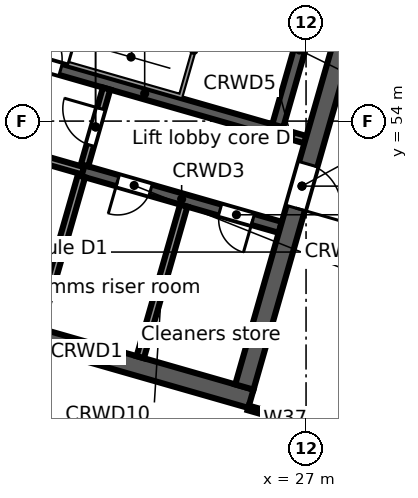
"""IFC4 building model, lengths in metres.
Left out: names, types, materials, properties, quantities, classifications, styles, units other than length and angle.
Written with IfcOpenShell. Run it as: python <this file> out.ifc"""

import sys

from ifc_helpers import new_model, si_unit, direction, frame, frame_2d, origin, place, context, subcontext, project, spatial, rectangle, extrude, element, fill, save


model = new_model("IFC4")
c1 = context("Model", 3, precision=1e-05, world=origin(), true_north=direction((0.0, 1.0)))
c2 = subcontext(c1, "Body", "Model", "MODEL_VIEW")
j1 = project(units=[si_unit("LENGTHUNIT", "METRE"), si_unit("PLANEANGLEUNIT", "RADIAN")], contexts=[c1])
p1 = place(None, origin())
s1 = spatial("IfcSite", under=j1, at=p1, CompositionType="ELEMENT")
p2 = place(p1, origin())
s2 = spatial("IfcBuilding", under=s1, at=p2, CompositionType="ELEMENT")
p3 = place(p2, frame((0.0, 0.0, 158.9)))
s3 = spatial("IfcBuildingStorey", under=s2, at=p3, CompositionType="ELEMENT", Elevation=158.9)
p4 = place(p3, frame((24.042, 41.106, 0.0), z_axis=(0.0, 0.0, 1.0), x_axis=(-0.961261693976, 0.275637362661, 0.0)))
e1 = element("IfcWall", 1, at=p4, inside=s3, PredefinedType="STANDARD", context=c2, shape_type="SweptSolid", body=[
    extrude(rectangle(XDim=24.948, YDim=0.3, at=frame_2d((12.474, 0.0))), origin(), (0.0, 0.0, 1.0), 3.68),
])
p5 = place(p4, frame((21.441, 0.0, 0.6)))
e2 = element("IfcOpeningElement", 2, at=p5, cuts=e1, PredefinedType="OPENING", context=c2, shape_type="SweptSolid", body=[
    extrude(rectangle(XDim=0.9, YDim=2.4, at=frame_2d((0.45, 1.2))), frame((0.0, 0.16, 0.0), z_axis=(0.0, -1.0, 0.0), x_axis=(1.0, 0.0, 0.0)), (0.0, 0.0, 1.0), 0.32),
])
p6 = place(p4, frame((13.121, 0.0, 0.6)))
e3 = element("IfcOpeningElement", 3, at=p6, cuts=e1, PredefinedType="OPENING", context=c2, shape_type="SweptSolid", body=[
    extrude(rectangle(XDim=0.9, YDim=2.4, at=frame_2d((0.45, 1.2))), frame((0.0, 0.16, 0.0), z_axis=(0.0, -1.0, 0.0), x_axis=(1.0, 0.0, 0.0)), (0.0, 0.0, 1.0), 0.32),
])
p7 = place(p4, frame((10.591, 0.0, 0.0)))
e4 = element("IfcOpeningElement", 4, at=p7, cuts=e1, PredefinedType="OPENING", context=c2, shape_type="SweptSolid", body=[
    extrude(rectangle(XDim=1.8, YDim=2.4, at=frame_2d((0.9, 1.2))), frame((0.0, 0.16, 0.0), z_axis=(0.0, -1.0, 0.0), x_axis=(1.0, 0.0, 0.0)), (0.0, 0.0, 1.0), 0.32),
])
p8 = place(p4, frame((4.8, 0.0, 0.6)))
e5 = element("IfcOpeningElement", 5, at=p8, cuts=e1, PredefinedType="OPENING", context=c2, shape_type="SweptSolid", body=[
    extrude(rectangle(XDim=0.9, YDim=2.4, at=frame_2d((0.45, 1.2))), frame((0.0, 0.16, 0.0), z_axis=(0.0, -1.0, 0.0), x_axis=(1.0, 0.0, 0.0)), (0.0, 0.0, 1.0), 0.32),
])
p9 = place(p4, frame((2.27, 0.0, 0.0)))
e6 = element("IfcOpeningElement", 6, at=p9, cuts=e1, PredefinedType="OPENING", context=c2, shape_type="SweptSolid", body=[
    extrude(rectangle(XDim=1.8, YDim=2.4, at=frame_2d((0.9, 1.2))), frame((0.0, 0.16, 0.0), z_axis=(0.0, -1.0, 0.0), x_axis=(1.0, 0.0, 0.0)), (0.0, 0.0, 1.0), 0.32),
])
p10 = place(p3, frame((37.399, 59.851, 0.0), z_axis=(0.0, 0.0, 1.0), x_axis=(-0.529919986982, -0.848047644532, 0.0)))
e7 = element("IfcWall", 7, at=p10, inside=s3, PredefinedType="STANDARD", context=c2, shape_type="SweptSolid", body=[
    extrude(rectangle(XDim=21.125, YDim=0.3, at=frame_2d((10.562, 0.0))), origin(), (0.0, 0.0, 1.0), 3.68),
])
p11 = place(p10, frame((16.687, 0.0, 0.6)))
e8 = element("IfcOpeningElement", 8, at=p11, cuts=e7, PredefinedType="OPENING", context=c2, shape_type="SweptSolid", body=[
    extrude(rectangle(XDim=0.9, YDim=2.4, at=frame_2d((0.45, 1.2))), frame((0.0, 0.16, 0.0), z_axis=(0.0, -1.0, 0.0), x_axis=(1.0, 0.0, 0.0)), (0.0, 0.0, 1.0), 0.32),
])
p12 = place(p10, frame((6.187, 0.0, 0.6)))
e9 = element("IfcOpeningElement", 9, at=p12, cuts=e7, PredefinedType="OPENING", context=c2, shape_type="SweptSolid", body=[
    extrude(rectangle(XDim=0.9, YDim=2.4, at=frame_2d((0.45, 1.2))), frame((0.0, 0.16, 0.0), z_axis=(0.0, -1.0, 0.0), x_axis=(1.0, 0.0, 0.0)), (0.0, 0.0, 1.0), 0.32),
])
p13 = place(p3, frame((16.897, 49.173, 0.0), z_axis=(0.0, 0.0, 1.0), x_axis=(0.96126248289, -0.275634611374, 0.0)))
e10 = element("IfcWall", 10, at=p13, inside=s3, PredefinedType="SOLIDWALL", context=c2, shape_type="SweptSolid", body=[
    extrude(rectangle(XDim=9.0, YDim=0.5, at=frame_2d((4.5, 0.0))), origin(), (0.0, 0.0, 1.0), 3.68),
])
p14 = place(p3, frame((18.632, 53.409, 0.0), z_axis=(0.0, 0.0, 1.0), x_axis=(0.961247078216, -0.275688328772, 0.0)))
e11 = element("IfcWall", 11, at=p14, inside=s3, PredefinedType="SOLIDWALL", context=c2, shape_type="SweptSolid", body=[
    extrude(rectangle(XDim=2.6, YDim=0.2, at=frame_2d((1.3, 0.0))), origin(), (0.0, 0.0, 1.0), 3.68),
])
p15 = place(p3, frame((21.131, 52.692, 0.0), z_axis=(0.0, 0.0, 1.0), x_axis=(0.961271043721, -0.27560475414, 0.0)))
e12 = element("IfcWall", 12, at=p15, inside=s3, PredefinedType="SOLIDWALL", context=c2, shape_type="SweptSolid", body=[
    extrude(rectangle(XDim=5.4, YDim=0.3, at=frame_2d((2.7, 0.0))), origin(), (0.0, 0.0, 1.0), 3.68),
])
p16 = place(p15, frame((0.95, 0.0, 0.0)))
e13 = element("IfcOpeningElement", 13, at=p16, cuts=e12, PredefinedType="OPENING", context=c2, shape_type="SweptSolid", body=[
    extrude(rectangle(XDim=0.9, YDim=2.1, at=frame_2d((0.45, 1.05))), frame((0.0, 0.16, 0.0), z_axis=(0.0, -1.0, 0.0), x_axis=(1.0, 0.0, 0.0)), (0.0, 0.0, 1.0), 0.32),
])
p17 = place(p15, frame((3.75, 0.0, 0.0)))
e14 = element("IfcOpeningElement", 14, at=p17, cuts=e12, PredefinedType="OPENING", context=c2, shape_type="SweptSolid", body=[
    extrude(rectangle(XDim=0.9, YDim=2.1, at=frame_2d((0.45, 1.05))), frame((0.0, 0.16, 0.0), z_axis=(0.0, -1.0, 0.0), x_axis=(1.0, 0.0, 0.0)), (0.0, 0.0, 1.0), 0.32),
])
p18 = place(p3, frame((19.293, 55.716, 0.0), z_axis=(0.0, 0.0, 1.0), x_axis=(0.96125862491, -0.275648065539, 0.0)))
e15 = element("IfcWall", 15, at=p18, inside=s3, PredefinedType="SOLIDWALL", context=c2, shape_type="SweptSolid", body=[
    extrude(rectangle(XDim=7.2, YDim=0.3, at=frame_2d((3.6, 0.0))), origin(), (0.0, 0.0, 1.0), 3.68),
])
p19 = place(p18, frame((0.3, 0.0, 0.0)))
e16 = element("IfcOpeningElement", 16, at=p19, cuts=e15, PredefinedType="OPENING", context=c2, shape_type="SweptSolid", body=[
    extrude(rectangle(XDim=1.0, YDim=2.1, at=frame_2d((0.5, 1.05))), frame((0.0, 0.16, 0.0), z_axis=(0.0, -1.0, 0.0), x_axis=(1.0, 0.0, 0.0)), (0.0, 0.0, 1.0), 0.32),
])
p20 = place(p3, frame((26.214, 53.732, 0.0), z_axis=(0.0, 0.0, 1.0), x_axis=(0.961200870072, -0.275849392554, 0.0)))
e17 = element("IfcWall", 17, at=p20, inside=s3, PredefinedType="SOLIDWALL", context=c2, shape_type="SweptSolid", body=[
    extrude(rectangle(XDim=0.8, YDim=0.2, at=frame_2d((0.4, 0.0))), origin(), (0.0, 0.0, 1.0), 3.68),
])
p21 = place(p3, frame((17.206, 49.344, 0.0), z_axis=(0.0, 0.0, 1.0), x_axis=(0.275632651182, 0.961263044958, 0.0)))
e18 = element("IfcWall", 18, at=p21, inside=s3, PredefinedType="SOLIDWALL", context=c2, shape_type="SweptSolid", body=[
    extrude(rectangle(XDim=11.0, YDim=0.5, at=frame_2d((5.5, 0.0))), origin(), (0.0, 0.0, 1.0), 3.68),
])
p22 = place(p21, frame((4.9, 0.0, 0.0)))
e19 = element("IfcOpeningElement", 19, at=p22, cuts=e18, PredefinedType="OPENING", context=c2, shape_type="SweptSolid", body=[
    extrude(rectangle(XDim=1.2, YDim=2.1, at=frame_2d((0.6, 1.05))), frame((0.0, 0.26, 0.0), z_axis=(0.0, -1.0, 0.0), x_axis=(1.0, 0.0, 0.0)), (0.0, 0.0, 1.0), 0.52),
])
p23 = place(p3, frame((19.946, 48.559, 0.0), z_axis=(0.0, 0.0, 1.0), x_axis=(0.275668905258, 0.961252648721, 0.0)))
e20 = element("IfcWall", 20, at=p23, inside=s3, PredefinedType="SOLIDWALL", context=c2, shape_type="SweptSolid", body=[
    extrude(rectangle(XDim=4.15, YDim=0.2, at=frame_2d((2.075, 0.0))), origin(), (0.0, 0.0, 1.0), 3.68),
])
p24 = place(p3, frame((21.172, 52.837, 0.0), z_axis=(0.0, 0.0, 1.0), x_axis=(0.275657676022, 0.961255868981, 0.0)))
e21 = element("IfcWall", 21, at=p24, inside=s3, PredefinedType="PARTITIONING", context=c2, shape_type="SweptSolid", body=[
    extrude(rectangle(XDim=2.1, YDim=0.2, at=frame_2d((1.05, 0.0))), origin(), (0.0, 0.0, 1.0), 3.68),
])
p25 = place(p24, frame((0.55, 0.0, 0.0)))
e22 = element("IfcOpeningElement", 22, at=p25, cuts=e21, PredefinedType="OPENING", context=c2, shape_type="SweptSolid", body=[
    extrude(rectangle(XDim=1.0, YDim=2.1, at=frame_2d((0.5, 1.05))), frame((0.0, 0.11, 0.0), z_axis=(0.0, -1.0, 0.0), x_axis=(1.0, 0.0, 0.0)), (0.0, 0.0, 1.0), 0.22),
])
p26 = place(p3, frame((22.637, 47.787, 0.0), z_axis=(0.0, 0.0, 1.0), x_axis=(0.275614546295, 0.961268236171, 0.0)))
e23 = element("IfcWall", 23, at=p26, inside=s3, PredefinedType="PARTITIONING", context=c2, shape_type="SweptSolid", body=[
    extrude(rectangle(XDim=4.15, YDim=0.2, at=frame_2d((2.075, 0.0))), origin(), (0.0, 0.0, 1.0), 3.68),
])
p27 = place(p3, frame((26.256, 53.876, 0.0), z_axis=(0.0, 0.0, 1.0), x_axis=(0.275614546295, 0.961268236171, 0.0)))
e24 = element("IfcWall", 24, at=p27, inside=s3, PredefinedType="SOLIDWALL", context=c2, shape_type="SweptSolid", body=[
    extrude(rectangle(XDim=4.15, YDim=0.3, at=frame_2d((2.075, 0.0))), origin(), (0.0, 0.0, 1.0), 3.68),
])
p28 = place(p3, frame((25.377, 47.002, 0.0), z_axis=(0.0, 0.0, 1.0), x_axis=(0.275632651182, 0.961263044958, 0.0)))
e25 = element("IfcWall", 25, at=p28, inside=s3, PredefinedType="SOLIDWALL", context=c2, shape_type="SweptSolid", body=[
    extrude(rectangle(XDim=11.0, YDim=0.5, at=frame_2d((5.5, 0.0))), origin(), (0.0, 0.0, 1.0), 3.68),
])
p29 = place(p28, frame((4.9, 0.0, 0.0)))
e26 = element("IfcOpeningElement", 26, at=p29, cuts=e25, PredefinedType="OPENING", context=c2, shape_type="SweptSolid", body=[
    extrude(rectangle(XDim=1.2, YDim=2.1, at=frame_2d((0.6, 1.05))), frame((0.0, 0.26, 0.0), z_axis=(0.0, -1.0, 0.0), x_axis=(1.0, 0.0, 0.0)), (0.0, 0.0, 1.0), 0.52),
])
p30 = place(p3, frame((25.479, 46.452, 0.0), z_axis=(0.0, 0.0, 1.0), x_axis=(0.961245725795, -0.275693044238, 0.0)))
e27 = element("IfcWall", 27, at=p30, inside=s3, PredefinedType="PARTITIONING", context=c2, shape_type="SweptSolid", body=[
    extrude(rectangle(XDim=2.023, YDim=0.125, at=frame_2d((1.012, 0.0))), origin(), (0.0, 0.0, 1.0), 2.952),
])
p31 = place(p19, origin())
e28 = element("IfcDoor", 28, at=p31, inside=s3, OperationType="SINGLE_SWING_LEFT", PredefinedType="DOOR", context=c2, shape_type="SweptSolid", body=[
    extrude(rectangle(XDim=1.0, YDim=2.1, at=frame_2d((0.5, 1.05))), frame((0.0, 0.025, 0.0), z_axis=(0.0, -1.0, 0.0), x_axis=(1.0, 0.0, 0.0)), (0.0, 0.0, 1.0), 0.05),
])
fill(e16, e28)
p32 = place(p25, origin())
e29 = element("IfcDoor", 29, at=p32, inside=s3, OperationType="SINGLE_SWING_RIGHT", PredefinedType="DOOR", context=c2, shape_type="SweptSolid", body=[
    extrude(rectangle(XDim=1.0, YDim=2.1, at=frame_2d((0.5, 1.05))), frame((0.0, 0.025, 0.0), z_axis=(0.0, -1.0, 0.0), x_axis=(1.0, 0.0, 0.0)), (0.0, 0.0, 1.0), 0.05),
])
fill(e22, e29)
p33 = place(p29, frame((1.2, 0.0, 0.0), z_axis=(0.0, 0.0, 1.0), x_axis=(-1.0, 0.0, 0.0)))
e30 = element("IfcDoor", 30, at=p33, inside=s3, OperationType="SINGLE_SWING_RIGHT", PredefinedType="DOOR", context=c2, shape_type="SweptSolid", body=[
    extrude(rectangle(XDim=1.2, YDim=2.1, at=frame_2d((0.6, 1.05))), frame((0.0, 0.025, 0.0), z_axis=(0.0, -1.0, 0.0), x_axis=(1.0, 0.0, 0.0)), (0.0, 0.0, 1.0), 0.05),
])
fill(e26, e30)
p34 = place(p16, frame((0.9, 0.0, 0.0), z_axis=(0.0, 0.0, 1.0), x_axis=(-1.0, 0.0, 0.0)))
e31 = element("IfcDoor", 31, at=p34, inside=s3, OperationType="SINGLE_SWING_RIGHT", PredefinedType="DOOR", context=c2, shape_type="SweptSolid", body=[
    extrude(rectangle(XDim=0.9, YDim=2.1, at=frame_2d((0.45, 1.05))), frame((0.0, 0.025, 0.0), z_axis=(0.0, -1.0, 0.0), x_axis=(1.0, 0.0, 0.0)), (0.0, 0.0, 1.0), 0.05),
])
fill(e13, e31)
p35 = place(p17, frame((0.9, 0.0, 0.0), z_axis=(0.0, 0.0, 1.0), x_axis=(-1.0, 0.0, 0.0)))
e32 = element("IfcDoor", 32, at=p35, inside=s3, OperationType="SINGLE_SWING_LEFT", PredefinedType="DOOR", context=c2, shape_type="SweptSolid", body=[
    extrude(rectangle(XDim=0.9, YDim=2.1, at=frame_2d((0.45, 1.05))), frame((0.0, 0.025, 0.0), z_axis=(0.0, -1.0, 0.0), x_axis=(1.0, 0.0, 0.0)), (0.0, 0.0, 1.0), 0.05),
])
fill(e14, e32)
save(model, sys.argv[1])
